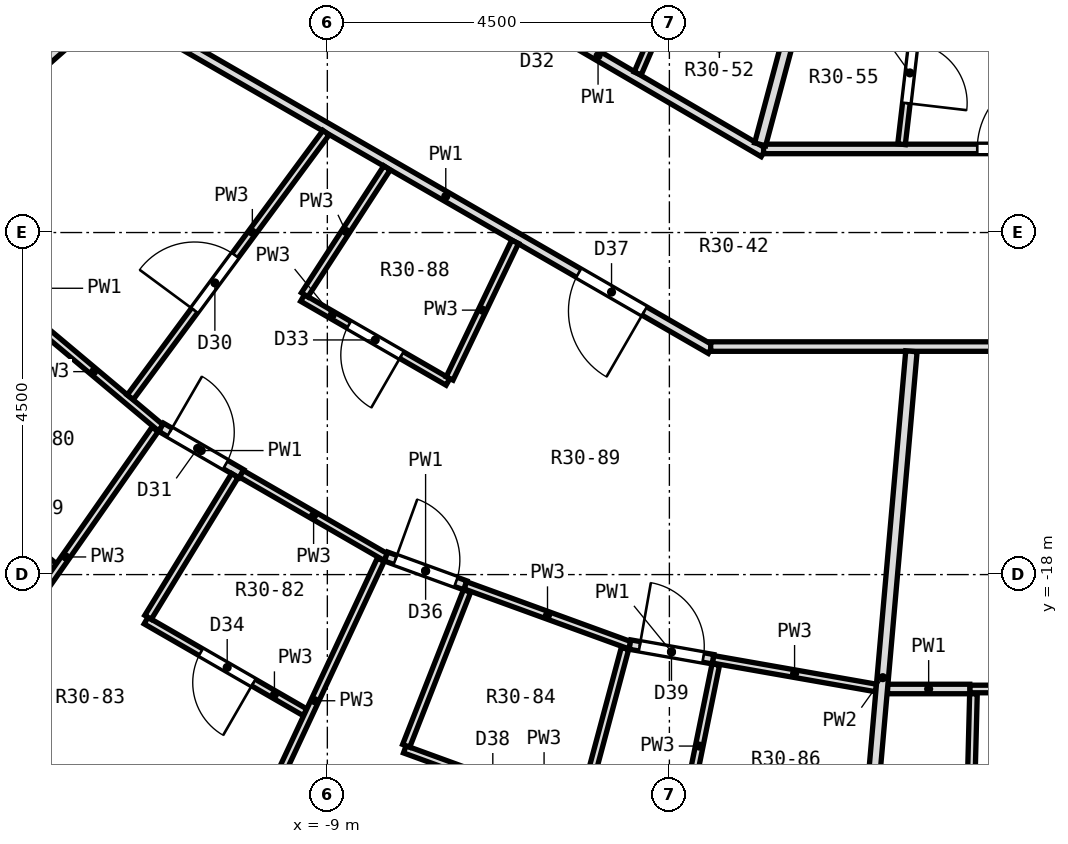
"""IFC4 building model, lengths in metres.
Left out: names, types, materials, properties, quantities, classifications, styles, units other than length and angle.
Written with IfcOpenShell. Run it as: python <this file> out.ifc"""

import sys

from ifc_helpers import new_model, si_unit, direction, frame, frame_2d, origin, place, context, subcontext, project, spatial, rectangle, extrude, element, fill, save


model = new_model("IFC4")
c1 = context("Model", 3, precision=1e-05, world=origin(), true_north=direction((0.0, 1.0)))
c2 = subcontext(c1, "Body", "Model", "MODEL_VIEW")
j1 = project(units=[si_unit("LENGTHUNIT", "METRE"), si_unit("PLANEANGLEUNIT", "RADIAN")], contexts=[c1])
p1 = place(None, origin())
s1 = spatial("IfcSite", under=j1, at=p1, CompositionType="ELEMENT")
p2 = place(p1, origin())
s2 = spatial("IfcBuilding", under=s1, at=p2, CompositionType="ELEMENT")
p3 = place(p2, frame((0.0, 0.0, 210.3)))
s3 = spatial("IfcBuildingStorey", under=s2, at=p3, CompositionType="ELEMENT", Elevation=210.3)
p4 = place(p3, frame((-13.796, -20.446, 0.0), z_axis=(0.0, 0.0, 1.0), x_axis=(0.86602648383, -0.499998129301, 0.0)))
e1 = element("IfcWall", 1, at=p4, inside=s3, PredefinedType="SOLIDWALL", context=c2, shape_type="SweptSolid", body=[
    extrude(rectangle(XDim=3.45, YDim=0.6, at=frame_2d((1.725, 0.0))), origin(), (0.0, 0.0, 1.0), 2.85),
])
p5 = place(p4, frame((0.625, 0.0, 0.9)))
e2 = element("IfcOpeningElement", 2, at=p5, cuts=e1, PredefinedType="OPENING", context=c2, shape_type="SweptSolid", body=[
    extrude(rectangle(XDim=2.2, YDim=1.8, at=frame_2d((1.1, 0.9))), frame((0.0, 0.312, 0.0), z_axis=(0.0, -1.0, 0.0), x_axis=(1.0, 0.0, 0.0)), (0.0, 0.0, 1.0), 0.624),
])
p6 = place(p3, frame((-14.442, -16.346, 0.0), z_axis=(0.0, 0.0, 1.0), x_axis=(0.765878189611, -0.642985690882, 0.0)))
e3 = element("IfcWall", 3, at=p6, inside=s3, PredefinedType="PARTITIONING", context=c2, shape_type="SweptSolid", body=[
    extrude(rectangle(XDim=2.414, YDim=0.1, at=frame_2d((1.207, 0.0))), origin(), (0.0, 0.0, 1.0), 2.85),
])
p7 = place(p6, frame((0.832, 0.0, 0.0)))
e4 = element("IfcOpeningElement", 4, at=p7, cuts=e3, PredefinedType="OPENING", context=c2, shape_type="SweptSolid", body=[
    extrude(rectangle(XDim=0.8, YDim=2.1, at=frame_2d((0.4, 1.05))), frame((0.0, 0.062, 0.0), z_axis=(0.0, -1.0, 0.0), x_axis=(1.0, 0.0, 0.0)), (0.0, 0.0, 1.0), 0.124),
])
p8 = place(p3, frame((-12.957, -14.589, 0.0), z_axis=(0.0, 0.0, 1.0), x_axis=(0.766099024104, -0.642722556993, 0.0)))
e5 = element("IfcWall", 5, at=p8, inside=s3, PredefinedType="PARTITIONING", context=c2, shape_type="SweptSolid", body=[
    extrude(rectangle(XDim=2.305, YDim=0.1, at=frame_2d((1.153, 0.0))), origin(), (0.0, 0.0, 1.0), 2.85),
])
p9 = place(p3, frame((-9.064, -9.056, 0.0), z_axis=(0.0, 0.0, 1.0), x_axis=(0.863361054342, -0.504586652464, 0.0)))
e6 = element("IfcWall", 6, at=p9, inside=s3, PredefinedType="PARTITIONING", context=c2, shape_type="SweptSolid", body=[
    extrude(rectangle(XDim=6.722, YDim=0.125, at=frame_2d((3.361, 0.0))), origin(), (0.0, 0.0, 1.0), 2.85),
])
p10 = place(p9, frame((2.771, 0.0, 0.0)))
e7 = element("IfcOpeningElement", 7, at=p10, cuts=e6, PredefinedType="OPENING", context=c2, shape_type="SweptSolid", body=[
    extrude(rectangle(XDim=1.0, YDim=2.1, at=frame_2d((0.5, 1.05))), frame((0.0, 0.074, 0.0), z_axis=(0.0, -1.0, 0.0), x_axis=(1.0, 0.0, 0.0)), (0.0, 0.0, 1.0), 0.149),
])
p11 = place(p3, frame((-11.186, -16.062, 0.0), z_axis=(0.0, 0.0, 1.0), x_axis=(0.865261949816, -0.501320015759, 0.0)))
e8 = element("IfcWall", 8, at=p11, inside=s3, PredefinedType="PARTITIONING", context=c2, shape_type="SweptSolid", body=[
    extrude(rectangle(XDim=1.221, YDim=0.125, at=frame_2d((0.61, 0.0))), origin(), (0.0, 0.0, 1.0), 2.85),
])
p12 = place(p11, frame((0.129, 0.0, 0.0)))
e9 = element("IfcOpeningElement", 9, at=p12, cuts=e8, PredefinedType="OPENING", context=c2, shape_type="SweptSolid", body=[
    extrude(rectangle(XDim=0.85, YDim=2.1, at=frame_2d((0.425, 1.05))), frame((0.0, 0.074, 0.0), z_axis=(0.0, -1.0, 0.0), x_axis=(1.0, 0.0, 0.0)), (0.0, 0.0, 1.0), 0.149),
])
p13 = place(p3, frame((-11.385, -18.605, 0.0), z_axis=(0.0, 0.0, 1.0), x_axis=(0.866145191815, -0.499792463624, 0.0)))
e10 = element("IfcWall", 10, at=p13, inside=s3, PredefinedType="PARTITIONING", context=c2, shape_type="SweptSolid", body=[
    extrude(rectangle(XDim=2.415, YDim=0.1, at=frame_2d((1.208, 0.0))), origin(), (0.0, 0.0, 1.0), 2.85),
])
p14 = place(p13, frame((0.833, 0.0, 0.0)))
e11 = element("IfcOpeningElement", 11, at=p14, cuts=e10, PredefinedType="OPENING", context=c2, shape_type="SweptSolid", body=[
    extrude(rectangle(XDim=0.8, YDim=2.1, at=frame_2d((0.4, 1.05))), frame((0.0, 0.062, 0.0), z_axis=(0.0, -1.0, 0.0), x_axis=(1.0, 0.0, 0.0)), (0.0, 0.0, 1.0), 0.124),
])
p15 = place(p3, frame((-10.13, -16.674, 0.0), z_axis=(0.0, 0.0, 1.0), x_axis=(0.866104006239, -0.499863831834, 0.0)))
e12 = element("IfcWall", 12, at=p15, inside=s3, PredefinedType="PARTITIONING", context=c2, shape_type="SweptSolid", body=[
    extrude(rectangle(XDim=2.192, YDim=0.1, at=frame_2d((1.096, 0.0))), origin(), (0.0, 0.0, 1.0), 2.85),
])
p16 = place(p3, frame((-9.326, -14.361, 0.0), z_axis=(0.0, 0.0, 1.0), x_axis=(0.866099077695, -0.499872371326, 0.0)))
e13 = element("IfcWall", 13, at=p16, inside=s3, PredefinedType="PARTITIONING", context=c2, shape_type="SweptSolid", body=[
    extrude(rectangle(XDim=2.208, YDim=0.1, at=frame_2d((1.104, 0.0))), origin(), (0.0, 0.0, 1.0), 2.85),
])
p17 = place(p16, frame((0.704, 0.0, 0.0)))
e14 = element("IfcOpeningElement", 14, at=p17, cuts=e13, PredefinedType="OPENING", context=c2, shape_type="SweptSolid", body=[
    extrude(rectangle(XDim=0.8, YDim=2.1, at=frame_2d((0.4, 1.05))), frame((0.0, 0.062, 0.0), z_axis=(0.0, -1.0, 0.0), x_axis=(1.0, 0.0, 0.0)), (0.0, 0.0, 1.0), 0.124),
])
p18 = place(p3, frame((-10.927, -11.012, 0.0), z_axis=(0.0, 0.0, 1.0), x_axis=(0.866043138087, -0.49996928203, 0.0)))
e15 = element("IfcWall", 15, at=p18, inside=s3, PredefinedType="PARTITIONING", context=c2, shape_type="SweptSolid", body=[
    extrude(rectangle(XDim=8.048, YDim=0.125, at=frame_2d((4.024, 0.0))), origin(), (0.0, 0.0, 1.0), 2.85),
])
p19 = place(p18, frame((6.042, 0.0, 0.0)))
e16 = element("IfcOpeningElement", 16, at=p19, cuts=e15, PredefinedType="OPENING", context=c2, shape_type="SweptSolid", body=[
    extrude(rectangle(XDim=1.0, YDim=2.1, at=frame_2d((0.5, 1.05))), frame((0.0, 0.074, 0.0), z_axis=(0.0, -1.0, 0.0), x_axis=(1.0, 0.0, 0.0)), (0.0, 0.0, 1.0), 0.149),
])
p20 = place(p3, frame((-7.981, -20.299, 0.0), z_axis=(0.0, 0.0, 1.0), x_axis=(0.939692991858, -0.342019123812, 0.0)))
e17 = element("IfcWall", 17, at=p20, inside=s3, PredefinedType="PARTITIONING", context=c2, shape_type="SweptSolid", body=[
    extrude(rectangle(XDim=2.414, YDim=0.1, at=frame_2d((1.207, 0.0))), origin(), (0.0, 0.0, 1.0), 2.85),
])
p21 = place(p20, frame((0.832, 0.0, 0.0)))
e18 = element("IfcOpeningElement", 18, at=p21, cuts=e17, PredefinedType="OPENING", context=c2, shape_type="SweptSolid", body=[
    extrude(rectangle(XDim=0.8, YDim=2.1, at=frame_2d((0.4, 1.05))), frame((0.0, 0.062, 0.0), z_axis=(0.0, -1.0, 0.0), x_axis=(1.0, 0.0, 0.0)), (0.0, 0.0, 1.0), 0.124),
])
p22 = place(p3, frame((-7.186, -18.141, 0.0), z_axis=(0.0, 0.0, 1.0), x_axis=(0.939651079277, -0.342134256123, 0.0)))
e19 = element("IfcWall", 19, at=p22, inside=s3, PredefinedType="PARTITIONING", context=c2, shape_type="SweptSolid", body=[
    extrude(rectangle(XDim=2.305, YDim=0.1, at=frame_2d((1.152, 0.0))), origin(), (0.0, 0.0, 1.0), 2.85),
])
p23 = place(p3, frame((-8.228, -17.762, 0.0), z_axis=(0.0, 0.0, 1.0), x_axis=(0.939793423488, -0.341743063087, 0.0)))
e20 = element("IfcWall", 20, at=p23, inside=s3, PredefinedType="PARTITIONING", context=c2, shape_type="SweptSolid", body=[
    extrude(rectangle(XDim=1.109, YDim=0.125, at=frame_2d((0.554, 0.0))), origin(), (0.0, 0.0, 1.0), 2.85),
])
p24 = place(p23, frame((0.129, 0.0, 0.0)))
e21 = element("IfcOpeningElement", 21, at=p24, cuts=e20, PredefinedType="OPENING", context=c2, shape_type="SweptSolid", body=[
    extrude(rectangle(XDim=0.85, YDim=2.1, at=frame_2d((0.425, 1.05))), frame((0.0, 0.074, 0.0), z_axis=(0.0, -1.0, 0.0), x_axis=(1.0, 0.0, 0.0)), (0.0, 0.0, 1.0), 0.149),
])
p25 = place(p3, frame((-3.927, -19.115, 0.0), z_axis=(0.0, 0.0, 1.0), x_axis=(0.984911838823, -0.173056839643, 0.0)))
e22 = element("IfcWall", 22, at=p25, inside=s3, PredefinedType="PARTITIONING", context=c2, shape_type="SweptSolid", body=[
    extrude(rectangle(XDim=2.18, YDim=0.1, at=frame_2d((1.09, 0.0))), origin(), (0.0, 0.0, 1.0), 2.85),
])
p26 = place(p3, frame((-5.019, -18.921, 0.0), z_axis=(0.0, 0.0, 1.0), x_axis=(0.984810132848, -0.173634680406, 0.0)))
e23 = element("IfcWall", 23, at=p26, inside=s3, PredefinedType="PARTITIONING", context=c2, shape_type="SweptSolid", body=[
    extrude(rectangle(XDim=1.109, YDim=0.125, at=frame_2d((0.555, 0.0))), origin(), (0.0, 0.0, 1.0), 2.85),
])
p27 = place(p26, frame((0.13, 0.0, 0.0)))
e24 = element("IfcOpeningElement", 24, at=p27, cuts=e23, PredefinedType="OPENING", context=c2, shape_type="SweptSolid", body=[
    extrude(rectangle(XDim=0.85, YDim=2.1, at=frame_2d((0.425, 1.05))), frame((0.0, 0.074, 0.0), z_axis=(0.0, -1.0, 0.0), x_axis=(1.0, 0.0, 0.0)), (0.0, 0.0, 1.0), 0.149),
])
p28 = place(p3, frame((-0.548, -19.505, 0.0), z_axis=(0.0, 0.0, 1.0), x_axis=(1.0, 0.0, 0.0)))
e25 = element("IfcWall", 25, at=p28, inside=s3, PredefinedType="PARTITIONING", context=c2, shape_type="SweptSolid", body=[
    extrude(rectangle(XDim=2.202, YDim=0.1, at=frame_2d((1.101, 0.0))), origin(), (0.0, 0.0, 1.0), 2.85),
])
p29 = place(p3, frame((-1.63, -19.505, 0.0), z_axis=(0.0, 0.0, 1.0), x_axis=(1.0, 0.0, 0.0)))
e26 = element("IfcWall", 26, at=p29, inside=s3, PredefinedType="PARTITIONING", context=c2, shape_type="SweptSolid", body=[
    extrude(rectangle(XDim=1.082, YDim=0.125, at=frame_2d((0.541, 0.0))), origin(), (0.0, 0.0, 1.0), 2.85),
])
p30 = place(p3, frame((-3.957, -15.0, 0.0), z_axis=(0.0, 0.0, 1.0), x_axis=(1.0, 0.0, 0.0)))
e27 = element("IfcWall", 27, at=p30, inside=s3, PredefinedType="PARTITIONING", context=c2, shape_type="SweptSolid", body=[
    extrude(rectangle(XDim=8.048, YDim=0.125, at=frame_2d((4.024, 0.0))), origin(), (0.0, 0.0, 1.0), 2.85),
])
p31 = place(p30, frame((4.463, 0.0, 0.0)))
e28 = element("IfcOpeningElement", 28, at=p31, cuts=e27, PredefinedType="OPENING", context=c2, shape_type="SweptSolid", body=[
    extrude(rectangle(XDim=1.0, YDim=2.1, at=frame_2d((0.5, 1.05))), frame((0.0, 0.074, 0.0), z_axis=(0.0, -1.0, 0.0), x_axis=(1.0, 0.0, 0.0)), (0.0, 0.0, 1.0), 0.149),
])
p32 = place(p3, frame((-3.26, -12.4, 0.0), z_axis=(0.0, 0.0, 1.0), x_axis=(1.0, 0.0, 0.0)))
e29 = element("IfcWall", 29, at=p32, inside=s3, PredefinedType="PARTITIONING", context=c2, shape_type="SweptSolid", body=[
    extrude(rectangle(XDim=6.509, YDim=0.125, at=frame_2d((3.254, 0.0))), origin(), (0.0, 0.0, 1.0), 2.85),
])
p33 = place(p32, frame((2.811, 0.0, 0.0)))
e30 = element("IfcOpeningElement", 30, at=p33, cuts=e29, PredefinedType="OPENING", context=c2, shape_type="SweptSolid", body=[
    extrude(rectangle(XDim=1.0, YDim=2.1, at=frame_2d((0.5, 1.05))), frame((0.0, 0.074, 0.0), z_axis=(0.0, -1.0, 0.0), x_axis=(1.0, 0.0, 0.0)), (0.0, 0.0, 1.0), 0.149),
])
p34 = place(p3, frame((-13.147, -11.631, 0.0), z_axis=(0.0, 0.0, 1.0), x_axis=(0.74894960679, 0.66262695877, 0.0)))
e31 = element("IfcWall", 31, at=p34, inside=s3, PredefinedType="PARTITIONING", context=c2, shape_type="SweptSolid", body=[
    extrude(rectangle(XDim=2.183, YDim=0.125, at=frame_2d((1.092, 0.0))), origin(), (0.0, 0.0, 1.0), 2.85),
])
p35 = place(p3, frame((-11.593, -15.667, 0.0), z_axis=(0.0, 0.0, 1.0), x_axis=(0.594790535758, 0.803880724096, 0.0)))
e32 = element("IfcWall", 32, at=p35, inside=s3, PredefinedType="PARTITIONING", context=c2, shape_type="SweptSolid", body=[
    extrude(rectangle(XDim=4.33, YDim=0.1, at=frame_2d((2.165, 0.0))), origin(), (0.0, 0.0, 1.0), 2.85),
])
p36 = place(p35, frame((1.421, 0.0, 0.0)))
e33 = element("IfcOpeningElement", 33, at=p36, cuts=e32, PredefinedType="OPENING", context=c2, shape_type="SweptSolid", body=[
    extrude(rectangle(XDim=0.9, YDim=2.1, at=frame_2d((0.45, 1.05))), frame((0.0, 0.062, 0.0), z_axis=(0.0, -1.0, 0.0), x_axis=(1.0, 0.0, 0.0)), (0.0, 0.0, 1.0), 0.124),
])
p37 = place(p3, frame((-13.617, -19.447, 0.0), z_axis=(0.0, 0.0, 1.0), x_axis=(0.573606249772, 0.819131167898, 0.0)))
e34 = element("IfcWall", 34, at=p37, inside=s3, PredefinedType="PARTITIONING", context=c2, shape_type="SweptSolid", body=[
    extrude(rectangle(XDim=4.099, YDim=0.1, at=frame_2d((2.049, 0.0))), origin(), (0.0, 0.0, 1.0), 2.85),
])
p38 = place(p3, frame((-9.299, -14.319, 0.0), z_axis=(0.0, 0.0, 1.0), x_axis=(0.544496746538, 0.838762954004, 0.0)))
e35 = element("IfcWall", 35, at=p38, inside=s3, PredefinedType="PARTITIONING", context=c2, shape_type="SweptSolid", body=[
    extrude(rectangle(XDim=1.99, YDim=0.1, at=frame_2d((0.995, 0.0))), origin(), (0.0, 0.0, 1.0), 2.85),
])
p39 = place(p3, frame((-11.359, -18.562, 0.0), z_axis=(0.0, 0.0, 1.0), x_axis=(0.522122387349, 0.852870572026, 0.0)))
e36 = element("IfcWall", 36, at=p39, inside=s3, PredefinedType="PARTITIONING", context=c2, shape_type="SweptSolid", body=[
    extrude(rectangle(XDim=2.188, YDim=0.1, at=frame_2d((1.094, 0.0))), origin(), (0.0, 0.0, 1.0), 2.85),
])
p40 = place(p3, frame((-7.391, -15.42, 0.0), z_axis=(0.0, 0.0, 1.0), x_axis=(0.432109804396, 0.901821000501, 0.0)))
e37 = element("IfcWall", 37, at=p40, inside=s3, PredefinedType="PARTITIONING", context=c2, shape_type="SweptSolid", body=[
    extrude(rectangle(XDim=1.993, YDim=0.1, at=frame_2d((0.997, 0.0))), origin(), (0.0, 0.0, 1.0), 2.85),
])
p41 = place(p3, frame((-10.032, -21.516, 0.0), z_axis=(0.0, 0.0, 1.0), x_axis=(0.423514808753, 0.90588918018, 0.0)))
e38 = element("IfcWall", 38, at=p41, inside=s3, PredefinedType="PARTITIONING", context=c2, shape_type="SweptSolid", body=[
    extrude(rectangle(XDim=4.098, YDim=0.1, at=frame_2d((2.049, 0.0))), origin(), (0.0, 0.0, 1.0), 2.85),
])
p42 = place(p3, frame((-4.917, -11.408, 0.0), z_axis=(0.0, 0.0, 1.0), x_axis=(0.395793869696, 0.918339377742, 0.0)))
e39 = element("IfcWall", 39, at=p42, inside=s3, PredefinedType="PARTITIONING", context=c2, shape_type="SweptSolid", body=[
    extrude(rectangle(XDim=1.901, YDim=0.1, at=frame_2d((0.951, 0.0))), origin(), (0.0, 0.0, 1.0), 2.85),
])
p43 = place(p42, frame((0.544, 0.0, 0.0)))
e40 = element("IfcOpeningElement", 40, at=p43, cuts=e39, PredefinedType="OPENING", context=c2, shape_type="SweptSolid", body=[
    extrude(rectangle(XDim=0.8, YDim=2.1, at=frame_2d((0.4, 1.05))), frame((0.0, 0.062, 0.0), z_axis=(0.0, -1.0, 0.0), x_axis=(1.0, 0.0, 0.0)), (0.0, 0.0, 1.0), 0.124),
])
p44 = place(p3, frame((-7.963, -20.252, 0.0), z_axis=(0.0, 0.0, 1.0), x_axis=(0.365959579046, 0.930630746593, 0.0)))
e41 = element("IfcWall", 41, at=p44, inside=s3, PredefinedType="PARTITIONING", context=c2, shape_type="SweptSolid", body=[
    extrude(rectangle(XDim=2.188, YDim=0.1, at=frame_2d((1.094, 0.0))), origin(), (0.0, 0.0, 1.0), 2.85),
])
p45 = place(p3, frame((-6.144, -22.931, 0.0), z_axis=(0.0, 0.0, 1.0), x_axis=(0.258608038295, 0.965982340692, 0.0)))
e42 = element("IfcWall", 42, at=p45, inside=s3, PredefinedType="PARTITIONING", context=c2, shape_type="SweptSolid", body=[
    extrude(rectangle(XDim=4.098, YDim=0.1, at=frame_2d((2.049, 0.0))), origin(), (0.0, 0.0, 1.0), 2.85),
])
p46 = place(p3, frame((-3.306, -12.34, 0.0), z_axis=(0.0, 0.0, 1.0), x_axis=(0.258514270355, 0.966007438907, 0.0)))
e43 = element("IfcWall", 43, at=p46, inside=s3, PredefinedType="PARTITIONING", context=c2, shape_type="SweptSolid", body=[
    extrude(rectangle(XDim=3.283, YDim=0.15, at=frame_2d((1.641, 0.0))), origin(), (0.0, 0.0, 1.0), 2.85),
])
p47 = place(p3, frame((-4.325, -21.328, 0.0), z_axis=(0.0, 0.0, 1.0), x_axis=(0.199033137994, 0.979992760167, 0.0)))
e44 = element("IfcWall", 44, at=p47, inside=s3, PredefinedType="PARTITIONING", context=c2, shape_type="SweptSolid", body=[
    extrude(rectangle(XDim=2.188, YDim=0.1, at=frame_2d((1.094, 0.0))), origin(), (0.0, 0.0, 1.0), 2.85),
])
p48 = place(p3, frame((-1.446, -12.338, 0.0), z_axis=(0.0, 0.0, 1.0), x_axis=(0.116222778511, 0.993223170166, 0.0)))
e45 = element("IfcWall", 45, at=p48, inside=s3, PredefinedType="PARTITIONING", context=c2, shape_type="SweptSolid", body=[
    extrude(rectangle(XDim=1.901, YDim=0.1, at=frame_2d((0.951, 0.0))), origin(), (0.0, 0.0, 1.0), 2.85),
])
p49 = place(p48, frame((0.544, 0.0, 0.0)))
e46 = element("IfcOpeningElement", 46, at=p49, cuts=e45, PredefinedType="OPENING", context=c2, shape_type="SweptSolid", body=[
    extrude(rectangle(XDim=0.8, YDim=2.1, at=frame_2d((0.4, 1.05))), frame((0.0, 0.062, 0.0), z_axis=(0.0, -1.0, 0.0), x_axis=(1.0, 0.0, 0.0)), (0.0, 0.0, 1.0), 0.124),
])
p50 = place(p3, frame((-2.07, -23.65, 0.0), z_axis=(0.0, 0.0, 1.0), x_axis=(0.087486308122, 0.996165722102, 0.0)))
e47 = element("IfcWall", 47, at=p50, inside=s3, PredefinedType="PARTITIONING", context=c2, shape_type="SweptSolid", body=[
    extrude(rectangle(XDim=8.62, YDim=0.15, at=frame_2d((4.31, 0.0))), origin(), (0.0, 0.0, 1.0), 2.85),
])
p51 = place(p3, frame((-0.556, -21.755, 0.0), z_axis=(0.0, 0.0, 1.0), x_axis=(0.025658328011, 0.999670770906, 0.0)))
e48 = element("IfcWall", 48, at=p51, inside=s3, PredefinedType="PARTITIONING", context=c2, shape_type="SweptSolid", body=[
    extrude(rectangle(XDim=2.188, YDim=0.1, at=frame_2d((1.094, 0.0))), origin(), (0.0, 0.0, 1.0), 2.85),
])
p52 = place(p36, origin())
e49 = element("IfcDoor", 49, at=p52, inside=s3, OperationType="SINGLE_SWING_LEFT", PredefinedType="DOOR", context=c2, shape_type="SweptSolid", body=[
    extrude(rectangle(XDim=0.9, YDim=2.1, at=frame_2d((0.45, 1.05))), frame((0.0, 0.025, 0.0), z_axis=(0.0, -1.0, 0.0), x_axis=(1.0, 0.0, 0.0)), (0.0, 0.0, 1.0), 0.05),
])
fill(e33, e49)
p53 = place(p12, origin())
e50 = element("IfcDoor", 50, at=p53, inside=s3, OperationType="SINGLE_SWING_LEFT", PredefinedType="DOOR", context=c2, shape_type="SweptSolid", body=[
    extrude(rectangle(XDim=0.85, YDim=2.1, at=frame_2d((0.425, 1.05))), frame((0.0, 0.025, 0.0), z_axis=(0.0, -1.0, 0.0), x_axis=(1.0, 0.0, 0.0)), (0.0, 0.0, 1.0), 0.05),
])
fill(e9, e50)
p54 = place(p17, frame((0.8, 0.0, 0.0), z_axis=(0.0, 0.0, 1.0), x_axis=(-1.0, 0.0, 0.0)))
e51 = element("IfcDoor", 51, at=p54, inside=s3, OperationType="SINGLE_SWING_LEFT", PredefinedType="DOOR", context=c2, shape_type="SweptSolid", body=[
    extrude(rectangle(XDim=0.8, YDim=2.1, at=frame_2d((0.4, 1.05))), frame((0.0, 0.025, 0.0), z_axis=(0.0, -1.0, 0.0), x_axis=(1.0, 0.0, 0.0)), (0.0, 0.0, 1.0), 0.05),
])
fill(e14, e51)
p55 = place(p14, frame((0.8, 0.0, 0.0), z_axis=(0.0, 0.0, 1.0), x_axis=(-1.0, 0.0, 0.0)))
e52 = element("IfcDoor", 52, at=p55, inside=s3, OperationType="SINGLE_SWING_LEFT", PredefinedType="DOOR", context=c2, shape_type="SweptSolid", body=[
    extrude(rectangle(XDim=0.8, YDim=2.1, at=frame_2d((0.4, 1.05))), frame((0.0, 0.025, 0.0), z_axis=(0.0, -1.0, 0.0), x_axis=(1.0, 0.0, 0.0)), (0.0, 0.0, 1.0), 0.05),
])
fill(e11, e52)
p56 = place(p24, origin())
e53 = element("IfcDoor", 53, at=p56, inside=s3, OperationType="SINGLE_SWING_LEFT", PredefinedType="DOOR", context=c2, shape_type="SweptSolid", body=[
    extrude(rectangle(XDim=0.85, YDim=2.1, at=frame_2d((0.425, 1.05))), frame((0.0, 0.025, 0.0), z_axis=(0.0, -1.0, 0.0), x_axis=(1.0, 0.0, 0.0)), (0.0, 0.0, 1.0), 0.05),
])
fill(e21, e53)
p57 = place(p19, frame((1.0, 0.0, 0.0), z_axis=(0.0, 0.0, 1.0), x_axis=(-1.0, 0.0, 0.0)))
e54 = element("IfcDoor", 54, at=p57, inside=s3, OperationType="SINGLE_SWING_LEFT", PredefinedType="DOOR", context=c2, shape_type="SweptSolid", body=[
    extrude(rectangle(XDim=1.0, YDim=2.1, at=frame_2d((0.5, 1.05))), frame((0.0, 0.025, 0.0), z_axis=(0.0, -1.0, 0.0), x_axis=(1.0, 0.0, 0.0)), (0.0, 0.0, 1.0), 0.05),
])
fill(e16, e54)
p58 = place(p27, origin())
e55 = element("IfcDoor", 55, at=p58, inside=s3, OperationType="SINGLE_SWING_LEFT", PredefinedType="DOOR", context=c2, shape_type="SweptSolid", body=[
    extrude(rectangle(XDim=0.85, YDim=2.1, at=frame_2d((0.425, 1.05))), frame((0.0, 0.025, 0.0), z_axis=(0.0, -1.0, 0.0), x_axis=(1.0, 0.0, 0.0)), (0.0, 0.0, 1.0), 0.05),
])
fill(e24, e55)
p59 = place(p49, frame((0.8, 0.0, 0.0), z_axis=(0.0, 0.0, 1.0), x_axis=(-1.0, 0.0, 0.0)))
e56 = element("IfcDoor", 56, at=p59, inside=s3, OperationType="SINGLE_SWING_RIGHT", PredefinedType="DOOR", context=c2, shape_type="SweptSolid", body=[
    extrude(rectangle(XDim=0.8, YDim=2.1, at=frame_2d((0.4, 1.05))), frame((0.0, 0.025, 0.0), z_axis=(0.0, -1.0, 0.0), x_axis=(1.0, 0.0, 0.0)), (0.0, 0.0, 1.0), 0.05),
])
fill(e46, e56)
p60 = place(p33, origin())
e57 = element("IfcDoor", 57, at=p60, inside=s3, OperationType="SINGLE_SWING_RIGHT", PredefinedType="DOOR", context=c2, shape_type="SweptSolid", body=[
    extrude(rectangle(XDim=1.0, YDim=2.1, at=frame_2d((0.5, 1.05))), frame((0.0, 0.025, 0.0), z_axis=(0.0, -1.0, 0.0), x_axis=(1.0, 0.0, 0.0)), (0.0, 0.0, 1.0), 0.05),
])
fill(e30, e57)
save(model, sys.argv[1])
